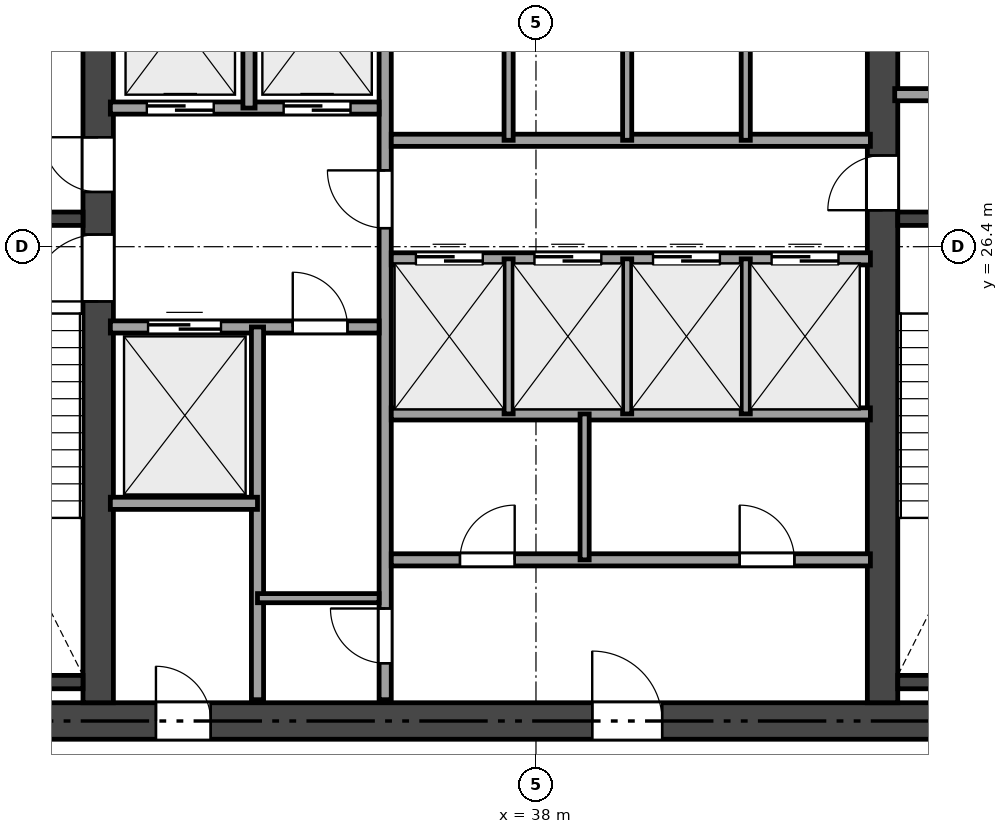
"""IFC4 building model, lengths in metres.
Left out: names, types, materials, properties, quantities, classifications, styles, units other than length and angle.
Written with IfcOpenShell. Run it as: python <this file> out.ifc"""

import sys

from ifc_helpers import new_model, si_unit, direction, frame, frame_2d, origin, place, context, subcontext, project, spatial, rectangle, extrude, element, fill, save


model = new_model("IFC4")
c1 = context("Model", 3, precision=1e-05, world=origin(), true_north=direction((0.0, 1.0)))
c2 = subcontext(c1, "Body", "Model", "MODEL_VIEW")
j1 = project(units=[si_unit("LENGTHUNIT", "METRE"), si_unit("PLANEANGLEUNIT", "RADIAN")], contexts=[c1])
p1 = place(None, origin())
s1 = spatial("IfcSite", under=j1, at=p1, CompositionType="ELEMENT")
p2 = place(p1, origin())
s2 = spatial("IfcBuilding", under=s1, at=p2, CompositionType="ELEMENT")
p3 = place(p2, frame((0.0, 0.0, 172.5)))
s3 = spatial("IfcBuildingStorey", under=s2, at=p3, CompositionType="ELEMENT", Elevation=172.5)
p4 = place(p3, frame((26.5, 18.6, 0.0), z_axis=(0.0, 0.0, 1.0), x_axis=(1.0, 0.0, 0.0)))
e1 = element("IfcWall", 1, at=p4, inside=s3, PredefinedType="SHEAR", context=c2, shape_type="SweptSolid", body=[
    extrude(rectangle(XDim=21.4, YDim=0.6, at=frame_2d((10.7, 0.0))), origin(), (0.0, 0.0, 1.0), 4.08),
])
p5 = place(p4, frame((12.425, 0.0, 0.0)))
e2 = element("IfcOpeningElement", 2, at=p5, cuts=e1, PredefinedType="OPENING", context=c2, shape_type="SweptSolid", body=[
    extrude(rectangle(XDim=1.15, YDim=2.15, at=frame_2d((0.575, 1.075))), frame((0.0, 0.31, 0.0), z_axis=(0.0, -1.0, 0.0), x_axis=(1.0, 0.0, 0.0)), (0.0, 0.0, 1.0), 0.62),
])
p6 = place(p4, frame((5.25, 0.0, 0.0)))
e3 = element("IfcOpeningElement", 3, at=p6, cuts=e1, PredefinedType="OPENING", context=c2, shape_type="SweptSolid", body=[
    extrude(rectangle(XDim=0.9, YDim=2.1, at=frame_2d((0.45, 1.05))), frame((0.0, 0.31, 0.0), z_axis=(0.0, -1.0, 0.0), x_axis=(1.0, 0.0, 0.0)), (0.0, 0.0, 1.0), 0.62),
])
p7 = place(p3, frame((30.8, 18.9, 0.0), z_axis=(0.0, 0.0, 1.0), x_axis=(0.0, 1.0, 0.0)))
e4 = element("IfcWall", 4, at=p7, inside=s3, PredefinedType="SHEAR", context=c2, shape_type="SweptSolid", body=[
    extrude(rectangle(XDim=15.0, YDim=0.5, at=frame_2d((7.5, 0.0))), origin(), (0.0, 0.0, 1.0), 4.08),
])
p8 = place(p7, frame((6.6, 0.0, 0.0)))
e5 = element("IfcOpeningElement", 5, at=p8, cuts=e4, PredefinedType="OPENING", context=c2, shape_type="SweptSolid", body=[
    extrude(rectangle(XDim=1.1, YDim=2.15, at=frame_2d((0.55, 1.075))), frame((0.0, 0.26, 0.0), z_axis=(0.0, -1.0, 0.0), x_axis=(1.0, 0.0, 0.0)), (0.0, 0.0, 1.0), 0.52),
])
p9 = place(p7, frame((8.4, 0.0, 0.0)))
e6 = element("IfcOpeningElement", 6, at=p9, cuts=e4, PredefinedType="OPENING", context=c2, shape_type="SweptSolid", body=[
    extrude(rectangle(XDim=0.9, YDim=2.1, at=frame_2d((0.45, 1.05))), frame((0.0, 0.26, 0.0), z_axis=(0.0, -1.0, 0.0), x_axis=(1.0, 0.0, 0.0)), (0.0, 0.0, 1.0), 0.52),
])
p10 = place(p3, frame((43.7, 18.9, 0.0), z_axis=(0.0, 0.0, 1.0), x_axis=(0.0, 1.0, 0.0)))
e7 = element("IfcWall", 7, at=p10, inside=s3, PredefinedType="SHEAR", context=c2, shape_type="SweptSolid", body=[
    extrude(rectangle(XDim=15.0, YDim=0.5, at=frame_2d((7.5, 0.0))), origin(), (0.0, 0.0, 1.0), 4.08),
])
p11 = place(p10, frame((8.1, 0.0, 0.0)))
e8 = element("IfcOpeningElement", 8, at=p11, cuts=e7, PredefinedType="OPENING", context=c2, shape_type="SweptSolid", body=[
    extrude(rectangle(XDim=0.9, YDim=2.1, at=frame_2d((0.45, 1.05))), frame((0.0, 0.26, 0.0), z_axis=(0.0, -1.0, 0.0), x_axis=(1.0, 0.0, 0.0)), (0.0, 0.0, 1.0), 0.52),
])
for number, where, z_axis, x_axis in (
    (9, (27.1, 26.86, 0.0), (0.0, 0.0, 1.0), (1.0, 0.0, 0.0)),
    (10, (27.1, 19.24, 0.0), (0.0, 0.0, 1.0), (1.0, 0.0, 0.0)),
):
    element("IfcWall", number, at=place(p3, frame(where, z_axis=z_axis, x_axis=x_axis)), inside=s3, PredefinedType="SHEAR", context=c2, shape_type="SweptSolid", body=[
        extrude(rectangle(XDim=3.45, YDim=0.22, at=frame_2d((1.725, 0.0))), origin(), (0.0, 0.0, 1.0), 4.08),
    ])
for number, where, z_axis, x_axis in (
    (11, (43.95, 26.86, 0.0), (0.0, 0.0, 1.0), (1.0, 0.0, 0.0)),
    (12, (43.95, 19.24, 0.0), (0.0, 0.0, 1.0), (1.0, 0.0, 0.0)),
):
    element("IfcWall", number, at=place(p3, frame(where, z_axis=z_axis, x_axis=x_axis)), inside=s3, PredefinedType="SHEAR", context=c2, shape_type="SweptSolid", body=[
        extrude(rectangle(XDim=3.35, YDim=0.22, at=frame_2d((1.675, 0.0))), origin(), (0.0, 0.0, 1.0), 4.08),
    ])
p12 = place(p3, frame((43.9, 28.9, 0.0), z_axis=(0.0, 0.0, 1.0), x_axis=(1.0, 0.0, 0.0)))
e13 = element("IfcWall", 13, at=p12, inside=s3, PredefinedType="SOLIDWALL", context=c2, shape_type="SweptSolid", body=[
    extrude(rectangle(XDim=3.35, YDim=0.2, at=frame_2d((1.675, 0.0))), origin(), (0.0, 0.0, 1.0), 4.08),
])
p13 = place(p12, frame((1.15, 0.0, 0.0)))
e14 = element("IfcOpeningElement", 14, at=p13, cuts=e13, PredefinedType="OPENING", context=c2, shape_type="SweptSolid", body=[
    extrude(rectangle(XDim=0.9, YDim=2.1, at=frame_2d((0.45, 1.05))), frame((0.0, 0.11, 0.0), z_axis=(0.0, -1.0, 0.0), x_axis=(1.0, 0.0, 0.0)), (0.0, 0.0, 1.0), 0.22),
])
p14 = place(p3, frame((35.52, 18.95, 0.0), z_axis=(0.0, 0.0, 1.0), x_axis=(0.0, 1.0, 0.0)))
e15 = element("IfcWall", 15, at=p14, inside=s3, PredefinedType="SOLIDWALL", context=c2, shape_type="SweptSolid", body=[
    extrude(rectangle(XDim=14.9, YDim=0.2, at=frame_2d((7.45, 0.0))), origin(), (0.0, 0.0, 1.0), 3.601),
])
p15 = place(p14, frame((7.755, 0.0, 0.0)))
e16 = element("IfcOpeningElement", 16, at=p15, cuts=e15, PredefinedType="OPENING", context=c2, shape_type="SweptSolid", body=[
    extrude(rectangle(XDim=0.95, YDim=2.15, at=frame_2d((0.475, 1.075))), frame((0.0, 0.11, 0.0), z_axis=(0.0, -1.0, 0.0), x_axis=(1.0, 0.0, 0.0)), (0.0, 0.0, 1.0), 0.22),
])
p16 = place(p14, frame((0.6, 0.0, 0.0)))
e17 = element("IfcOpeningElement", 17, at=p16, cuts=e15, PredefinedType="OPENING", context=c2, shape_type="SweptSolid", body=[
    extrude(rectangle(XDim=0.9, YDim=2.1, at=frame_2d((0.45, 1.05))), frame((0.0, 0.11, 0.0), z_axis=(0.0, -1.0, 0.0), x_axis=(1.0, 0.0, 0.0)), (0.0, 0.0, 1.0), 0.22),
])
p17 = place(p3, frame((31.0, 28.68, 0.0), z_axis=(0.0, 0.0, 1.0), x_axis=(1.0, 0.0, 0.0)))
e18 = element("IfcWall", 18, at=p17, inside=s3, PredefinedType="SOLIDWALL", context=c2, shape_type="SweptSolid", body=[
    extrude(rectangle(XDim=4.42, YDim=0.2, at=frame_2d((2.21, 0.0))), origin(), (0.0, 0.0, 1.0), 4.08),
])
p18 = place(p17, frame((0.6, 0.0, 0.0)))
e19 = element("IfcOpeningElement", 19, at=p18, cuts=e18, PredefinedType="OPENING", context=c2, shape_type="SweptSolid", body=[
    extrude(rectangle(XDim=1.1, YDim=2.15, at=frame_2d((0.55, 1.075))), frame((0.0, 0.11, 0.0), z_axis=(0.0, -1.0, 0.0), x_axis=(1.0, 0.0, 0.0)), (0.0, 0.0, 1.0), 0.22),
])
p19 = place(p17, frame((2.85, 0.0, 0.0)))
e20 = element("IfcOpeningElement", 20, at=p19, cuts=e18, PredefinedType="OPENING", context=c2, shape_type="SweptSolid", body=[
    extrude(rectangle(XDim=1.1, YDim=2.15, at=frame_2d((0.55, 1.075))), frame((0.0, 0.11, 0.0), z_axis=(0.0, -1.0, 0.0), x_axis=(1.0, 0.0, 0.0)), (0.0, 0.0, 1.0), 0.22),
])
p20 = place(p3, frame((33.28, 28.68, 0.0), z_axis=(0.0, 0.0, 1.0), x_axis=(0.0, 1.0, 0.0)))
e21 = element("IfcWall", 21, at=p20, inside=s3, PredefinedType="SOLIDWALL", context=c2, shape_type="SweptSolid", body=[
    extrude(rectangle(XDim=2.82, YDim=0.2, at=frame_2d((1.41, 0.0))), origin(), (0.0, 0.0, 1.0), 4.08),
])
p21 = place(p3, frame((31.0, 25.08, 0.0), z_axis=(0.0, 0.0, 1.0), x_axis=(1.0, 0.0, 0.0)))
e22 = element("IfcWall", 22, at=p21, inside=s3, PredefinedType="SOLIDWALL", context=c2, shape_type="SweptSolid", body=[
    extrude(rectangle(XDim=4.42, YDim=0.2, at=frame_2d((2.21, 0.0))), origin(), (0.0, 0.0, 1.0), 4.08),
])
p22 = place(p21, frame((3.0, 0.0, 0.0)))
e23 = element("IfcOpeningElement", 23, at=p22, cuts=e22, PredefinedType="OPENING", context=c2, shape_type="SweptSolid", body=[
    extrude(rectangle(XDim=0.9, YDim=2.1, at=frame_2d((0.45, 1.05))), frame((0.0, 0.11, 0.0), z_axis=(0.0, -1.0, 0.0), x_axis=(1.0, 0.0, 0.0)), (0.0, 0.0, 1.0), 0.22),
])
p23 = place(p21, frame((0.62, 0.0, 0.0)))
e24 = element("IfcOpeningElement", 24, at=p23, cuts=e22, PredefinedType="OPENING", context=c2, shape_type="SweptSolid", body=[
    extrude(rectangle(XDim=1.2, YDim=2.15, at=frame_2d((0.6, 1.075))), frame((0.0, 0.11, 0.0), z_axis=(0.0, -1.0, 0.0), x_axis=(1.0, 0.0, 0.0)), (0.0, 0.0, 1.0), 0.22),
])
p24 = place(p3, frame((33.42, 18.95, 0.0), z_axis=(0.0, 0.0, 1.0), x_axis=(0.0, 1.0, 0.0)))
e25 = element("IfcWall", 25, at=p24, inside=s3, PredefinedType="SOLIDWALL", context=c2, shape_type="SweptSolid", body=[
    extrude(rectangle(XDim=6.13, YDim=0.2, at=frame_2d((3.065, 0.0))), origin(), (0.0, 0.0, 1.0), 3.601),
])
p25 = place(p3, frame((31.0, 22.18, 0.0), z_axis=(0.0, 0.0, 1.0), x_axis=(1.0, 0.0, 0.0)))
e26 = element("IfcWall", 26, at=p25, inside=s3, PredefinedType="SOLIDWALL", context=c2, shape_type="SweptSolid", body=[
    extrude(rectangle(XDim=2.42, YDim=0.2, at=frame_2d((1.21, 0.0))), origin(), (0.0, 0.0, 1.0), 4.08),
])
p26 = place(p3, frame((33.42, 20.62, 0.0), z_axis=(0.0, 0.0, 1.0), x_axis=(1.0, 0.0, 0.0)))
e27 = element("IfcWall", 27, at=p26, inside=s3, PredefinedType="PARTITIONING", context=c2, shape_type="SweptSolid", body=[
    extrude(rectangle(XDim=2.0, YDim=0.15, at=frame_2d((1.0, 0.0))), origin(), (0.0, 0.0, 1.0), 4.08),
])
p27 = place(p3, frame((35.62, 28.15, 0.0), z_axis=(0.0, 0.0, 1.0), x_axis=(1.0, 0.0, 0.0)))
e28 = element("IfcWall", 28, at=p27, inside=s3, PredefinedType="SOLIDWALL", context=c2, shape_type="SweptSolid", body=[
    extrude(rectangle(XDim=7.88, YDim=0.2, at=frame_2d((3.94, 0.0))), origin(), (0.0, 0.0, 1.0), 4.08),
])
p28 = place(p3, frame((35.62, 26.2, 0.0), z_axis=(0.0, 0.0, 1.0), x_axis=(1.0, 0.0, 0.0)))
e29 = element("IfcWall", 29, at=p28, inside=s3, PredefinedType="SOLIDWALL", context=c2, shape_type="SweptSolid", body=[
    extrude(rectangle(XDim=7.88, YDim=0.2, at=frame_2d((3.94, 0.0))), origin(), (0.0, 0.0, 1.0), 4.08),
])
p29 = place(p28, frame((0.405, 0.0, 0.0)))
e30 = element("IfcOpeningElement", 30, at=p29, cuts=e29, PredefinedType="OPENING", context=c2, shape_type="SweptSolid", body=[
    extrude(rectangle(XDim=1.1, YDim=2.15, at=frame_2d((0.55, 1.075))), frame((0.0, 0.11, 0.0), z_axis=(0.0, -1.0, 0.0), x_axis=(1.0, 0.0, 0.0)), (0.0, 0.0, 1.0), 0.22),
])
p30 = place(p28, frame((2.355, 0.0, 0.0)))
e31 = element("IfcOpeningElement", 31, at=p30, cuts=e29, PredefinedType="OPENING", context=c2, shape_type="SweptSolid", body=[
    extrude(rectangle(XDim=1.1, YDim=2.15, at=frame_2d((0.55, 1.075))), frame((0.0, 0.11, 0.0), z_axis=(0.0, -1.0, 0.0), x_axis=(1.0, 0.0, 0.0)), (0.0, 0.0, 1.0), 0.22),
])
p31 = place(p28, frame((4.305, 0.0, 0.0)))
e32 = element("IfcOpeningElement", 32, at=p31, cuts=e29, PredefinedType="OPENING", context=c2, shape_type="SweptSolid", body=[
    extrude(rectangle(XDim=1.1, YDim=2.15, at=frame_2d((0.55, 1.075))), frame((0.0, 0.11, 0.0), z_axis=(0.0, -1.0, 0.0), x_axis=(1.0, 0.0, 0.0)), (0.0, 0.0, 1.0), 0.22),
])
p32 = place(p28, frame((6.255, 0.0, 0.0)))
e33 = element("IfcOpeningElement", 33, at=p32, cuts=e29, PredefinedType="OPENING", context=c2, shape_type="SweptSolid", body=[
    extrude(rectangle(XDim=1.1, YDim=2.15, at=frame_2d((0.55, 1.075))), frame((0.0, 0.11, 0.0), z_axis=(0.0, -1.0, 0.0), x_axis=(1.0, 0.0, 0.0)), (0.0, 0.0, 1.0), 0.22),
])
p33 = place(p3, frame((35.62, 23.65, 0.0), z_axis=(0.0, 0.0, 1.0), x_axis=(1.0, 0.0, 0.0)))
e34 = element("IfcWall", 34, at=p33, inside=s3, PredefinedType="SOLIDWALL", context=c2, shape_type="SweptSolid", body=[
    extrude(rectangle(XDim=7.88, YDim=0.2, at=frame_2d((3.94, 0.0))), origin(), (0.0, 0.0, 1.0), 3.601),
])
p34 = place(p3, frame((35.62, 21.25, 0.0), z_axis=(0.0, 0.0, 1.0), x_axis=(1.0, 0.0, 0.0)))
e35 = element("IfcWall", 35, at=p34, inside=s3, PredefinedType="SOLIDWALL", context=c2, shape_type="SweptSolid", body=[
    extrude(rectangle(XDim=7.88, YDim=0.2, at=frame_2d((3.94, 0.0))), origin(), (0.0, 0.0, 1.0), 4.08),
])
p35 = place(p34, frame((1.13, 0.0, 0.0)))
e36 = element("IfcOpeningElement", 36, at=p35, cuts=e35, PredefinedType="OPENING", context=c2, shape_type="SweptSolid", body=[
    extrude(rectangle(XDim=0.9, YDim=2.1, at=frame_2d((0.45, 1.05))), frame((0.0, 0.11, 0.0), z_axis=(0.0, -1.0, 0.0), x_axis=(1.0, 0.0, 0.0)), (0.0, 0.0, 1.0), 0.22),
])
p36 = place(p34, frame((5.73, 0.0, 0.0)))
e37 = element("IfcOpeningElement", 37, at=p36, cuts=e35, PredefinedType="OPENING", context=c2, shape_type="SweptSolid", body=[
    extrude(rectangle(XDim=0.9, YDim=2.1, at=frame_2d((0.45, 1.05))), frame((0.0, 0.11, 0.0), z_axis=(0.0, -1.0, 0.0), x_axis=(1.0, 0.0, 0.0)), (0.0, 0.0, 1.0), 0.22),
])
for number, where, z_axis, x_axis in (
    (38, (37.55, 28.15, 0.0), (0.0, 0.0, 1.0), (0.0, 1.0, 0.0)),
    (39, (39.5, 28.15, 0.0), (0.0, 0.0, 1.0), (0.0, 1.0, 0.0)),
    (40, (41.45, 28.15, 0.0), (0.0, 0.0, 1.0), (0.0, 1.0, 0.0)),
):
    element("IfcWall", number, at=place(p3, frame(where, z_axis=z_axis, x_axis=x_axis)), inside=s3, PredefinedType="PARTITIONING", context=c2, shape_type="SweptSolid", body=[
        extrude(rectangle(XDim=2.43, YDim=0.15, at=frame_2d((1.215, 0.0))), origin(), (0.0, 0.0, 1.0), 4.08),
    ])
for number, where, z_axis, x_axis in (
    (41, (37.55, 23.65, 0.0), (0.0, 0.0, 1.0), (0.0, 1.0, 0.0)),
    (42, (39.5, 23.65, 0.0), (0.0, 0.0, 1.0), (0.0, 1.0, 0.0)),
    (43, (41.45, 23.65, 0.0), (0.0, 0.0, 1.0), (0.0, 1.0, 0.0)),
):
    element("IfcWall", number, at=place(p3, frame(where, z_axis=z_axis, x_axis=x_axis)), inside=s3, PredefinedType="PARTITIONING", context=c2, shape_type="SweptSolid", body=[
        extrude(rectangle(XDim=2.55, YDim=0.15, at=frame_2d((1.275, 0.0))), origin(), (0.0, 0.0, 1.0), 3.601),
    ])
p37 = place(p3, frame((38.8, 21.25, 0.0), z_axis=(0.0, 0.0, 1.0), x_axis=(0.0, 1.0, 0.0)))
e44 = element("IfcWall", 44, at=p37, inside=s3, PredefinedType="PARTITIONING", context=c2, shape_type="SweptSolid", body=[
    extrude(rectangle(XDim=2.4, YDim=0.15, at=frame_2d((1.2, 0.0))), origin(), (0.0, 0.0, 1.0), 3.601),
])
p38 = place(p8, origin())
e45 = element("IfcDoor", 45, at=p38, inside=s3, OperationType="SINGLE_SWING_LEFT", PredefinedType="DOOR", context=c2, shape_type="SweptSolid", body=[
    extrude(rectangle(XDim=1.1, YDim=2.15, at=frame_2d((0.55, 1.075))), frame((0.0, 0.025, 0.0), z_axis=(0.0, -1.0, 0.0), x_axis=(1.0, 0.0, 0.0)), (0.0, 0.0, 1.0), 0.05),
])
fill(e5, e45)
p39 = place(p15, origin())
e46 = element("IfcDoor", 46, at=p39, inside=s3, OperationType="SINGLE_SWING_RIGHT", PredefinedType="DOOR", context=c2, shape_type="SweptSolid", body=[
    extrude(rectangle(XDim=0.95, YDim=2.15, at=frame_2d((0.475, 1.075))), frame((0.0, 0.025, 0.0), z_axis=(0.0, -1.0, 0.0), x_axis=(1.0, 0.0, 0.0)), (0.0, 0.0, 1.0), 0.05),
])
fill(e16, e46)
p40 = place(p11, origin())
e47 = element("IfcDoor", 47, at=p40, inside=s3, OperationType="SINGLE_SWING_LEFT", PredefinedType="DOOR", context=c2, shape_type="SweptSolid", body=[
    extrude(rectangle(XDim=0.9, YDim=2.1, at=frame_2d((0.45, 1.05))), frame((0.0, 0.025, 0.0), z_axis=(0.0, -1.0, 0.0), x_axis=(1.0, 0.0, 0.0)), (0.0, 0.0, 1.0), 0.05),
])
fill(e8, e47)
p41 = place(p5, origin())
e48 = element("IfcDoor", 48, at=p41, inside=s3, OperationType="SINGLE_SWING_LEFT", PredefinedType="DOOR", context=c2, shape_type="SweptSolid", body=[
    extrude(rectangle(XDim=1.15, YDim=2.15, at=frame_2d((0.575, 1.075))), frame((0.0, 0.025, 0.0), z_axis=(0.0, -1.0, 0.0), x_axis=(1.0, 0.0, 0.0)), (0.0, 0.0, 1.0), 0.05),
])
fill(e2, e48)
p42 = place(p9, origin())
e49 = element("IfcDoor", 49, at=p42, inside=s3, OperationType="SINGLE_SWING_RIGHT", PredefinedType="DOOR", context=c2, shape_type="SweptSolid", body=[
    extrude(rectangle(XDim=0.9, YDim=2.1, at=frame_2d((0.45, 1.05))), frame((0.0, 0.025, 0.0), z_axis=(0.0, -1.0, 0.0), x_axis=(1.0, 0.0, 0.0)), (0.0, 0.0, 1.0), 0.05),
])
fill(e6, e49)
p43 = place(p6, origin())
e50 = element("IfcDoor", 50, at=p43, inside=s3, OperationType="SINGLE_SWING_LEFT", PredefinedType="DOOR", context=c2, shape_type="SweptSolid", body=[
    extrude(rectangle(XDim=0.9, YDim=2.1, at=frame_2d((0.45, 1.05))), frame((0.0, 0.025, 0.0), z_axis=(0.0, -1.0, 0.0), x_axis=(1.0, 0.0, 0.0)), (0.0, 0.0, 1.0), 0.05),
])
fill(e3, e50)
p44 = place(p16, origin())
e51 = element("IfcDoor", 51, at=p44, inside=s3, OperationType="SINGLE_SWING_RIGHT", PredefinedType="DOOR", context=c2, shape_type="SweptSolid", body=[
    extrude(rectangle(XDim=0.9, YDim=2.1, at=frame_2d((0.45, 1.05))), frame((0.0, 0.025, 0.0), z_axis=(0.0, -1.0, 0.0), x_axis=(1.0, 0.0, 0.0)), (0.0, 0.0, 1.0), 0.05),
])
fill(e17, e51)
p45 = place(p22, origin())
e52 = element("IfcDoor", 52, at=p45, inside=s3, OperationType="SINGLE_SWING_LEFT", PredefinedType="DOOR", context=c2, shape_type="SweptSolid", body=[
    extrude(rectangle(XDim=0.9, YDim=2.1, at=frame_2d((0.45, 1.05))), frame((0.0, 0.025, 0.0), z_axis=(0.0, -1.0, 0.0), x_axis=(1.0, 0.0, 0.0)), (0.0, 0.0, 1.0), 0.05),
])
fill(e23, e52)
p46 = place(p35, origin())
e53 = element("IfcDoor", 53, at=p46, inside=s3, OperationType="SINGLE_SWING_RIGHT", PredefinedType="DOOR", context=c2, shape_type="SweptSolid", body=[
    extrude(rectangle(XDim=0.9, YDim=2.1, at=frame_2d((0.45, 1.05))), frame((0.0, 0.025, 0.0), z_axis=(0.0, -1.0, 0.0), x_axis=(1.0, 0.0, 0.0)), (0.0, 0.0, 1.0), 0.05),
])
fill(e36, e53)
p47 = place(p36, origin())
e54 = element("IfcDoor", 54, at=p47, inside=s3, OperationType="SINGLE_SWING_LEFT", PredefinedType="DOOR", context=c2, shape_type="SweptSolid", body=[
    extrude(rectangle(XDim=0.9, YDim=2.1, at=frame_2d((0.45, 1.05))), frame((0.0, 0.025, 0.0), z_axis=(0.0, -1.0, 0.0), x_axis=(1.0, 0.0, 0.0)), (0.0, 0.0, 1.0), 0.05),
])
fill(e37, e54)
p48 = place(p18, origin())
e55 = element("IfcDoor", 55, at=p48, inside=s3, OperationType="SLIDING_TO_LEFT", PredefinedType="DOOR", context=c2, shape_type="SweptSolid", body=[
    extrude(rectangle(XDim=1.1, YDim=2.15, at=frame_2d((0.55, 1.075))), frame((0.0, 0.025, 0.0), z_axis=(0.0, -1.0, 0.0), x_axis=(1.0, 0.0, 0.0)), (0.0, 0.0, 1.0), 0.05),
])
fill(e19, e55)
p49 = place(p19, origin())
e56 = element("IfcDoor", 56, at=p49, inside=s3, OperationType="SLIDING_TO_LEFT", PredefinedType="DOOR", context=c2, shape_type="SweptSolid", body=[
    extrude(rectangle(XDim=1.1, YDim=2.15, at=frame_2d((0.55, 1.075))), frame((0.0, 0.025, 0.0), z_axis=(0.0, -1.0, 0.0), x_axis=(1.0, 0.0, 0.0)), (0.0, 0.0, 1.0), 0.05),
])
fill(e20, e56)
p50 = place(p23, origin())
e57 = element("IfcDoor", 57, at=p50, inside=s3, OperationType="SLIDING_TO_LEFT", PredefinedType="DOOR", context=c2, shape_type="SweptSolid", body=[
    extrude(rectangle(XDim=1.2, YDim=2.15, at=frame_2d((0.6, 1.075))), frame((0.0, 0.025, 0.0), z_axis=(0.0, -1.0, 0.0), x_axis=(1.0, 0.0, 0.0)), (0.0, 0.0, 1.0), 0.05),
])
fill(e24, e57)
p51 = place(p29, origin())
e58 = element("IfcDoor", 58, at=p51, inside=s3, OperationType="SLIDING_TO_LEFT", PredefinedType="DOOR", context=c2, shape_type="SweptSolid", body=[
    extrude(rectangle(XDim=1.1, YDim=2.15, at=frame_2d((0.55, 1.075))), frame((0.0, 0.025, 0.0), z_axis=(0.0, -1.0, 0.0), x_axis=(1.0, 0.0, 0.0)), (0.0, 0.0, 1.0), 0.05),
])
fill(e30, e58)
p52 = place(p30, origin())
e59 = element("IfcDoor", 59, at=p52, inside=s3, OperationType="SLIDING_TO_LEFT", PredefinedType="DOOR", context=c2, shape_type="SweptSolid", body=[
    extrude(rectangle(XDim=1.1, YDim=2.15, at=frame_2d((0.55, 1.075))), frame((0.0, 0.025, 0.0), z_axis=(0.0, -1.0, 0.0), x_axis=(1.0, 0.0, 0.0)), (0.0, 0.0, 1.0), 0.05),
])
fill(e31, e59)
p53 = place(p31, origin())
e60 = element("IfcDoor", 60, at=p53, inside=s3, OperationType="SLIDING_TO_LEFT", PredefinedType="DOOR", context=c2, shape_type="SweptSolid", body=[
    extrude(rectangle(XDim=1.1, YDim=2.15, at=frame_2d((0.55, 1.075))), frame((0.0, 0.025, 0.0), z_axis=(0.0, -1.0, 0.0), x_axis=(1.0, 0.0, 0.0)), (0.0, 0.0, 1.0), 0.05),
])
fill(e32, e60)
p54 = place(p32, origin())
e61 = element("IfcDoor", 61, at=p54, inside=s3, OperationType="SLIDING_TO_LEFT", PredefinedType="DOOR", context=c2, shape_type="SweptSolid", body=[
    extrude(rectangle(XDim=1.1, YDim=2.15, at=frame_2d((0.55, 1.075))), frame((0.0, 0.025, 0.0), z_axis=(0.0, -1.0, 0.0), x_axis=(1.0, 0.0, 0.0)), (0.0, 0.0, 1.0), 0.05),
])
fill(e33, e61)
save(model, sys.argv[1])
